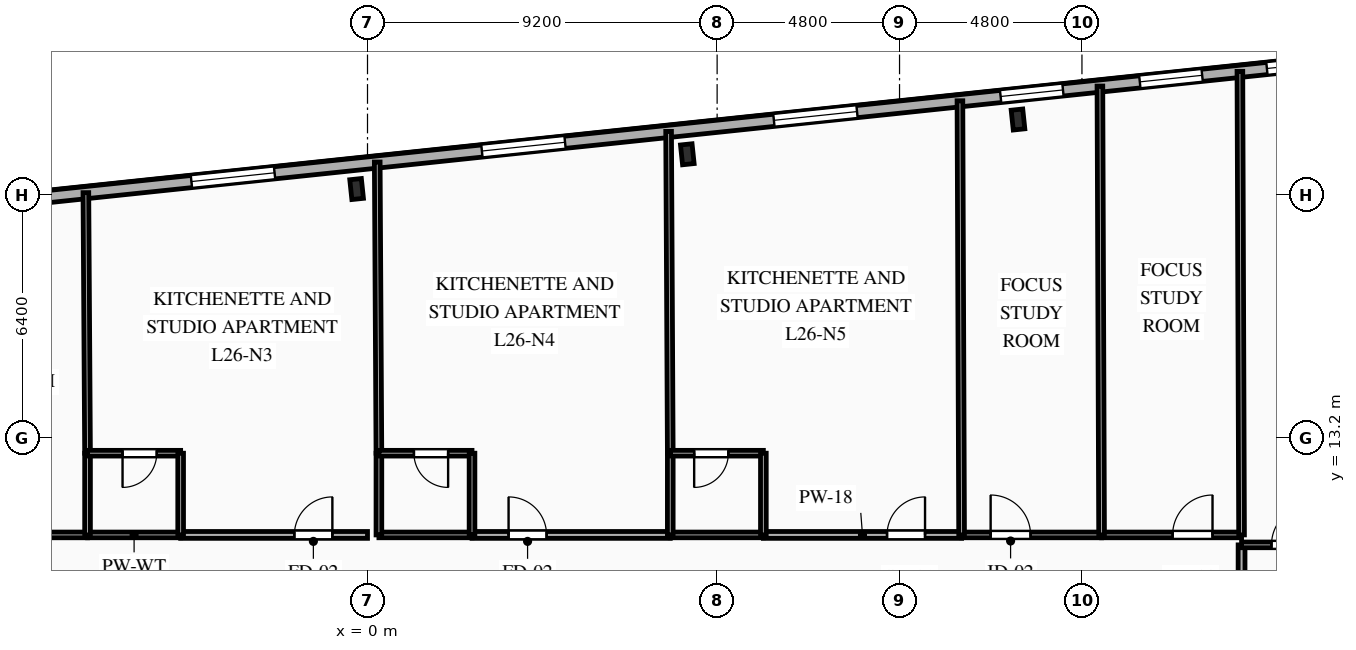
"""IFC4 building model, lengths in metres.
Left out: names, types, materials, properties, quantities, classifications, styles, units other than length and angle.
Written with IfcOpenShell. Run it as: python <this file> out.ifc"""

import sys

from ifc_helpers import new_model, si_unit, direction, frame, frame_2d, origin, origin_2d, place, context, subcontext, project, spatial, rectangle, i_section, extrude, element, fill, save


model = new_model("IFC4")
c1 = context("Model", 3, precision=1e-05, world=origin(), true_north=direction((0.0, 1.0)))
c2 = subcontext(c1, "Body", "Model", "MODEL_VIEW")
j1 = project(units=[si_unit("LENGTHUNIT", "METRE"), si_unit("PLANEANGLEUNIT", "RADIAN")], contexts=[c1])
p1 = place(None, origin())
s1 = spatial("IfcSite", under=j1, at=p1, CompositionType="ELEMENT")
p2 = place(p1, origin())
s2 = spatial("IfcBuilding", under=s1, at=p2, CompositionType="ELEMENT")
p3 = place(p2, frame((0.0, 0.0, 95.75)))
s3 = spatial("IfcBuildingStorey", under=s2, at=p3, CompositionType="ELEMENT", Elevation=95.75)
for number, where, z_axis, x_axis in (
    (1, (17.117, 21.58, 0.0), (0.0, 0.0, 1.0), (0.995, 0.105, 0.0)),
    (2, (8.415, 20.666, 0.0), (0.0, 0.0, 1.0), (0.995, 0.105, 0.0)),
    (3, (-0.287, 19.751, 0.0), (0.0, 0.0, 1.0), (0.995, 0.105, 0.0)),
):
    element("IfcColumn", number, at=place(p3, frame(where, z_axis=z_axis, x_axis=x_axis)), inside=s3, PredefinedType="COLUMN", context=c2, shape_type="SweptSolid", body=[
        extrude(i_section(OverallWidth=0.306, OverallDepth=0.524, WebThickness=0.021, FlangeThickness=0.04, FilletRadius=0.027, at=origin_2d()), origin(), (0.0, 0.0, 1.0), 3.35),
    ])
p4 = place(p3, frame((-27.107, 17.586, 0.0), z_axis=(0.0, 0.0, 1.0), x_axis=(0.994521628355, 0.104531003701, 0.0)))
e4 = element("IfcWall", 4, at=p4, inside=s3, PredefinedType="SOLIDWALL", context=c2, shape_type="SweptSolid", body=[
    extrude(rectangle(XDim=53.8, YDim=0.32, at=frame_2d((26.9, 0.0))), origin(), (0.0, 0.0, 1.0), 3.045),
])
p5 = place(p4, frame((7.261, 0.0, 0.85)))
e5 = element("IfcOpeningElement", 5, at=p5, cuts=e4, PredefinedType="OPENING", context=c2, shape_type="SweptSolid", body=[
    extrude(rectangle(XDim=1.65, YDim=1.85, at=frame_2d((0.825, 0.925))), frame((0.0, 0.17, 0.0), z_axis=(0.0, -1.0, 0.0), x_axis=(1.0, 0.0, 0.0)), (0.0, 0.0, 1.0), 0.34),
])
p6 = place(p4, frame((16.423, 0.0, 0.85)))
e6 = element("IfcOpeningElement", 6, at=p6, cuts=e4, PredefinedType="OPENING", context=c2, shape_type="SweptSolid", body=[
    extrude(rectangle(XDim=1.5, YDim=1.85, at=frame_2d((0.75, 0.925))), frame((0.0, 0.17, 0.0), z_axis=(0.0, -1.0, 0.0), x_axis=(1.0, 0.0, 0.0)), (0.0, 0.0, 1.0), 0.34),
])
p7 = place(p4, frame((22.598, 0.0, 0.85)))
e7 = element("IfcOpeningElement", 7, at=p7, cuts=e4, PredefinedType="OPENING", context=c2, shape_type="SweptSolid", body=[
    extrude(rectangle(XDim=2.2, YDim=1.85, at=frame_2d((1.1, 0.925))), frame((0.0, 0.17, 0.0), z_axis=(0.0, -1.0, 0.0), x_axis=(1.0, 0.0, 0.0)), (0.0, 0.0, 1.0), 0.34),
])
p8 = place(p4, frame((30.283, 0.0, 0.85)))
e8 = element("IfcOpeningElement", 8, at=p8, cuts=e4, PredefinedType="OPENING", context=c2, shape_type="SweptSolid", body=[
    extrude(rectangle(XDim=2.2, YDim=1.85, at=frame_2d((1.1, 0.925))), frame((0.0, 0.17, 0.0), z_axis=(0.0, -1.0, 0.0), x_axis=(1.0, 0.0, 0.0)), (0.0, 0.0, 1.0), 0.34),
])
p9 = place(p4, frame((38.009, 0.0, 0.85)))
e9 = element("IfcOpeningElement", 9, at=p9, cuts=e4, PredefinedType="OPENING", context=c2, shape_type="SweptSolid", body=[
    extrude(rectangle(XDim=2.2, YDim=1.85, at=frame_2d((1.1, 0.925))), frame((0.0, 0.17, 0.0), z_axis=(0.0, -1.0, 0.0), x_axis=(1.0, 0.0, 0.0)), (0.0, 0.0, 1.0), 0.34),
])
p10 = place(p4, frame((44.008, 0.0, 0.85)))
e10 = element("IfcOpeningElement", 10, at=p10, cuts=e4, PredefinedType="OPENING", context=c2, shape_type="SweptSolid", body=[
    extrude(rectangle(XDim=1.65, YDim=1.85, at=frame_2d((0.825, 0.925))), frame((0.0, 0.17, 0.0), z_axis=(0.0, -1.0, 0.0), x_axis=(1.0, 0.0, 0.0)), (0.0, 0.0, 1.0), 0.34),
])
p11 = place(p4, frame((47.691, 0.0, 0.85)))
e11 = element("IfcOpeningElement", 11, at=p11, cuts=e4, PredefinedType="OPENING", context=c2, shape_type="SweptSolid", body=[
    extrude(rectangle(XDim=1.65, YDim=1.85, at=frame_2d((0.825, 0.925))), frame((0.0, 0.17, 0.0), z_axis=(0.0, -1.0, 0.0), x_axis=(1.0, 0.0, 0.0)), (0.0, 0.0, 1.0), 0.34),
])
p12 = place(p4, frame((51.054, 0.0, 0.85)))
e12 = element("IfcOpeningElement", 12, at=p12, cuts=e4, PredefinedType="OPENING", context=c2, shape_type="SweptSolid", body=[
    extrude(rectangle(XDim=1.65, YDim=1.85, at=frame_2d((0.825, 0.925))), frame((0.0, 0.17, 0.0), z_axis=(0.0, -1.0, 0.0), x_axis=(1.0, 0.0, 0.0)), (0.0, 0.0, 1.0), 0.34),
])
p13 = place(p3, frame((-12.683, 10.65, 0.0), z_axis=(0.0, 0.0, 1.0), x_axis=(1.0, 0.0, 0.0)))
e13 = element("IfcWall", 13, at=p13, inside=s3, PredefinedType="PARTITIONING", context=c2, shape_type="SweptSolid", body=[
    extrude(rectangle(XDim=5.316, YDim=0.15, at=frame_2d((2.658, 0.0))), origin(), (0.0, 0.0, 1.0), 3.045),
])
p14 = place(p13, frame((0.981, 0.0, 0.0)))
e14 = element("IfcOpeningElement", 14, at=p14, cuts=e13, PredefinedType="OPENING", context=c2, shape_type="SweptSolid", body=[
    extrude(rectangle(XDim=0.95, YDim=2.1, at=frame_2d((0.475, 1.05))), frame((0.0, 0.085, 0.0), z_axis=(0.0, -1.0, 0.0), x_axis=(1.0, 0.0, 0.0)), (0.0, 0.0, 1.0), 0.17),
])
p15 = place(p3, frame((-4.917, 10.65, 0.0), z_axis=(0.0, 0.0, 1.0), x_axis=(1.0, 0.0, 0.0)))
e15 = element("IfcWall", 15, at=p15, inside=s3, PredefinedType="PARTITIONING", context=c2, shape_type="SweptSolid", body=[
    extrude(rectangle(XDim=4.917, YDim=0.18, at=frame_2d((2.458, 0.0))), origin(), (0.0, 0.0, 1.0), 3.045),
])
p16 = place(p15, frame((2.992, 0.0, 0.0)))
e16 = element("IfcOpeningElement", 16, at=p16, cuts=e15, PredefinedType="OPENING", context=c2, shape_type="SweptSolid", body=[
    extrude(rectangle(XDim=1.0, YDim=2.15, at=frame_2d((0.5, 1.075))), frame((0.0, 0.1, 0.0), z_axis=(0.0, -1.0, 0.0), x_axis=(1.0, 0.0, 0.0)), (0.0, 0.0, 1.0), 0.2),
])
p17 = place(p3, frame((-7.367, 10.65, 0.0), z_axis=(0.0, 0.0, 1.0), x_axis=(1.0, 0.0, 0.0)))
e17 = element("IfcWall", 17, at=p17, inside=s3, PredefinedType="PLUMBINGWALL", context=c2, shape_type="SweptSolid", body=[
    extrude(rectangle(XDim=2.45, YDim=0.15, at=frame_2d((1.225, 0.0))), origin(), (0.0, 0.0, 1.0), 3.045),
])
p18 = place(p3, frame((23.0, 10.388, 0.0), z_axis=(0.0, 0.0, 1.0), x_axis=(0.0, -1.0, 0.0)))
e18 = element("IfcWall", 18, at=p18, inside=s3, PredefinedType="PARTITIONING", context=c2, shape_type="SweptSolid", body=[
    extrude(rectangle(XDim=1.888, YDim=0.18, at=frame_2d((0.944, 0.0))), origin(), (0.0, 0.0, 1.0), 3.045),
])
p19 = place(p3, frame((2.75, 10.65, 0.0), z_axis=(0.0, 0.0, 1.0), x_axis=(1.0, 0.0, 0.0)))
e19 = element("IfcWall", 19, at=p19, inside=s3, PredefinedType="PARTITIONING", context=c2, shape_type="SweptSolid", body=[
    extrude(rectangle(XDim=5.217, YDim=0.18, at=frame_2d((2.608, 0.0))), origin(), (0.0, 0.0, 1.0), 3.045),
])
p20 = place(p19, frame((0.962, 0.0, 0.0)))
e20 = element("IfcOpeningElement", 20, at=p20, cuts=e19, PredefinedType="OPENING", context=c2, shape_type="SweptSolid", body=[
    extrude(rectangle(XDim=1.0, YDim=2.15, at=frame_2d((0.5, 1.075))), frame((0.0, 0.1, 0.0), z_axis=(0.0, -1.0, 0.0), x_axis=(1.0, 0.0, 0.0)), (0.0, 0.0, 1.0), 0.2),
])
p21 = place(p3, frame((0.3, 10.65, 0.0), z_axis=(0.0, 0.0, 1.0), x_axis=(1.0, 0.0, 0.0)))
e21 = element("IfcWall", 21, at=p21, inside=s3, PredefinedType="PLUMBINGWALL", context=c2, shape_type="SweptSolid", body=[
    extrude(rectangle(XDim=2.45, YDim=0.15, at=frame_2d((1.225, 0.0))), origin(), (0.0, 0.0, 1.0), 3.045),
])
p22 = place(p3, frame((10.417, 10.65, 0.0), z_axis=(0.0, 0.0, 1.0), x_axis=(1.0, 0.0, 0.0)))
e22 = element("IfcWall", 22, at=p22, inside=s3, PredefinedType="PARTITIONING", context=c2, shape_type="SweptSolid", body=[
    extrude(rectangle(XDim=5.216, YDim=0.18, at=frame_2d((2.608, 0.0))), origin(), (0.0, 0.0, 1.0), 3.045),
])
p23 = place(p22, frame((3.254, 0.0, 0.0)))
e23 = element("IfcOpeningElement", 23, at=p23, cuts=e22, PredefinedType="OPENING", context=c2, shape_type="SweptSolid", body=[
    extrude(rectangle(XDim=1.0, YDim=2.15, at=frame_2d((0.5, 1.075))), frame((0.0, 0.1, 0.0), z_axis=(0.0, -1.0, 0.0), x_axis=(1.0, 0.0, 0.0)), (0.0, 0.0, 1.0), 0.2),
])
p24 = place(p3, frame((7.967, 10.65, 0.0), z_axis=(0.0, 0.0, 1.0), x_axis=(1.0, 0.0, 0.0)))
e24 = element("IfcWall", 24, at=p24, inside=s3, PredefinedType="PLUMBINGWALL", context=c2, shape_type="SweptSolid", body=[
    extrude(rectangle(XDim=2.45, YDim=0.15, at=frame_2d((1.225, 0.0))), origin(), (0.0, 0.0, 1.0), 3.045),
])
p25 = place(p3, frame((15.633, 10.65, 0.0), z_axis=(0.0, 0.0, 1.0), x_axis=(1.0, 0.0, 0.0)))
e25 = element("IfcWall", 25, at=p25, inside=s3, PredefinedType="PARTITIONING", context=c2, shape_type="SweptSolid", body=[
    extrude(rectangle(XDim=3.683, YDim=0.15, at=frame_2d((1.842, 0.0))), origin(), (0.0, 0.0, 1.0), 3.045),
])
p26 = place(p25, frame((0.764, 0.0, 0.0)))
e26 = element("IfcOpeningElement", 26, at=p26, cuts=e25, PredefinedType="OPENING", context=c2, shape_type="SweptSolid", body=[
    extrude(rectangle(XDim=1.05, YDim=2.15, at=frame_2d((0.525, 1.075))), frame((0.0, 0.085, 0.0), z_axis=(0.0, -1.0, 0.0), x_axis=(1.0, 0.0, 0.0)), (0.0, 0.0, 1.0), 0.17),
])
p27 = place(p3, frame((19.316, 10.65, 0.0), z_axis=(0.0, 0.0, 1.0), x_axis=(1.0, 0.0, 0.0)))
e27 = element("IfcWall", 27, at=p27, inside=s3, PredefinedType="PARTITIONING", context=c2, shape_type="SweptSolid", body=[
    extrude(rectangle(XDim=3.684, YDim=0.15, at=frame_2d((1.842, 0.0))), origin(), (0.0, 0.0, 1.0), 3.045),
])
p28 = place(p27, frame((1.869, 0.0, 0.0)))
e28 = element("IfcOpeningElement", 28, at=p28, cuts=e27, PredefinedType="OPENING", context=c2, shape_type="SweptSolid", body=[
    extrude(rectangle(XDim=1.05, YDim=2.15, at=frame_2d((0.525, 1.075))), frame((0.0, 0.085, 0.0), z_axis=(0.0, -1.0, 0.0), x_axis=(1.0, 0.0, 0.0)), (0.0, 0.0, 1.0), 0.17),
])
p29 = place(p3, frame((23.0, 10.388, 0.0), z_axis=(0.0, 0.0, 1.0), x_axis=(1.0, 0.0, 0.0)))
e29 = element("IfcWall", 29, at=p29, inside=s3, PredefinedType="PARTITIONING", context=c2, shape_type="SweptSolid", body=[
    extrude(rectangle(XDim=3.871, YDim=0.15, at=frame_2d((1.936, 0.0))), origin(), (0.0, 0.0, 1.0), 3.045),
])
p30 = place(p29, frame((0.788, 0.0, 0.0)))
e30 = element("IfcOpeningElement", 30, at=p30, cuts=e29, PredefinedType="OPENING", context=c2, shape_type="SweptSolid", body=[
    extrude(rectangle(XDim=1.05, YDim=2.15, at=frame_2d((0.525, 1.075))), frame((0.0, 0.085, 0.0), z_axis=(0.0, -1.0, 0.0), x_axis=(1.0, 0.0, 0.0)), (0.0, 0.0, 1.0), 0.17),
])
p31 = place(p3, frame((23.0, 10.65, 0.0), z_axis=(0.0, 0.0, 1.0), x_axis=(-0.0036027147, 0.999993510202, 0.0)))
e31 = element("IfcWall", 31, at=p31, inside=s3, PredefinedType="PARTITIONING", context=c2, shape_type="SweptSolid", body=[
    extrude(rectangle(XDim=12.198, YDim=0.15, at=frame_2d((6.099, 0.0))), origin(), (0.0, 0.0, 1.0), 3.045),
])
p32 = place(p3, frame((-7.411, 19.656, 0.0), z_axis=(0.0, 0.0, 1.0), x_axis=(0.006409668201, -0.999979457866, 0.0)))
e32 = element("IfcWall", 32, at=p32, inside=s3, PredefinedType="PARTITIONING", context=c2, shape_type="SweptSolid", body=[
    extrude(rectangle(XDim=6.856, YDim=0.15, at=frame_2d((3.428, 0.0))), origin(), (0.0, 0.0, 1.0), 3.045),
])
p33 = place(p3, frame((-7.367, 12.8, 0.0), z_axis=(0.0, 0.0, 1.0), x_axis=(0.0, -1.0, 0.0)))
e33 = element("IfcWall", 33, at=p33, inside=s3, PredefinedType="PLUMBINGWALL", context=c2, shape_type="SweptSolid", body=[
    extrude(rectangle(XDim=2.15, YDim=0.15, at=frame_2d((1.075, 0.0))), origin(), (0.0, 0.0, 1.0), 3.045),
])
p34 = place(p3, frame((-4.917, 12.8, 0.0), z_axis=(0.0, 0.0, 1.0), x_axis=(-1.0, 0.0, 0.0)))
e34 = element("IfcWall", 34, at=p34, inside=s3, PredefinedType="PLUMBINGWALL", context=c2, shape_type="SweptSolid", body=[
    extrude(rectangle(XDim=2.45, YDim=0.15, at=frame_2d((1.225, 0.0))), origin(), (0.0, 0.0, 1.0), 3.045),
])
p35 = place(p34, frame((0.629, 0.0, 0.0)))
e35 = element("IfcOpeningElement", 35, at=p35, cuts=e34, PredefinedType="OPENING", context=c2, shape_type="SweptSolid", body=[
    extrude(rectangle(XDim=0.9, YDim=2.1, at=frame_2d((0.45, 1.05))), frame((0.0, 0.085, 0.0), z_axis=(0.0, -1.0, 0.0), x_axis=(1.0, 0.0, 0.0)), (0.0, 0.0, 1.0), 0.17),
])
p36 = place(p3, frame((-4.917, 10.65, 0.0), z_axis=(0.0, 0.0, 1.0), x_axis=(0.0, 1.0, 0.0)))
e36 = element("IfcWall", 36, at=p36, inside=s3, PredefinedType="PLUMBINGWALL", context=c2, shape_type="SweptSolid", body=[
    extrude(rectangle(XDim=2.15, YDim=0.15, at=frame_2d((1.075, 0.0))), origin(), (0.0, 0.0, 1.0), 3.045),
])
p37 = place(p3, frame((0.256, 20.462, 0.0), z_axis=(0.0, 0.0, 1.0), x_axis=(0.00573567775, -0.999983550865, 0.0)))
e37 = element("IfcWall", 37, at=p37, inside=s3, PredefinedType="PARTITIONING", context=c2, shape_type="SweptSolid", body=[
    extrude(rectangle(XDim=7.662, YDim=0.15, at=frame_2d((3.831, 0.0))), origin(), (0.0, 0.0, 1.0), 3.045),
])
p38 = place(p3, frame((0.3, 12.8, 0.0), z_axis=(0.0, 0.0, 1.0), x_axis=(0.0, -1.0, 0.0)))
e38 = element("IfcWall", 38, at=p38, inside=s3, PredefinedType="PLUMBINGWALL", context=c2, shape_type="SweptSolid", body=[
    extrude(rectangle(XDim=2.15, YDim=0.15, at=frame_2d((1.075, 0.0))), origin(), (0.0, 0.0, 1.0), 3.045),
])
p39 = place(p3, frame((2.75, 12.8, 0.0), z_axis=(0.0, 0.0, 1.0), x_axis=(-1.0, 0.0, 0.0)))
e39 = element("IfcWall", 39, at=p39, inside=s3, PredefinedType="PLUMBINGWALL", context=c2, shape_type="SweptSolid", body=[
    extrude(rectangle(XDim=2.45, YDim=0.15, at=frame_2d((1.225, 0.0))), origin(), (0.0, 0.0, 1.0), 3.045),
])
p40 = place(p39, frame((0.629, 0.0, 0.0)))
e40 = element("IfcOpeningElement", 40, at=p40, cuts=e39, PredefinedType="OPENING", context=c2, shape_type="SweptSolid", body=[
    extrude(rectangle(XDim=0.9, YDim=2.1, at=frame_2d((0.45, 1.05))), frame((0.0, 0.085, 0.0), z_axis=(0.0, -1.0, 0.0), x_axis=(1.0, 0.0, 0.0)), (0.0, 0.0, 1.0), 0.17),
])
p41 = place(p3, frame((2.75, 10.65, 0.0), z_axis=(0.0, 0.0, 1.0), x_axis=(0.0, 1.0, 0.0)))
e41 = element("IfcWall", 41, at=p41, inside=s3, PredefinedType="PLUMBINGWALL", context=c2, shape_type="SweptSolid", body=[
    extrude(rectangle(XDim=2.15, YDim=0.15, at=frame_2d((1.075, 0.0))), origin(), (0.0, 0.0, 1.0), 3.045),
])
p42 = place(p3, frame((7.923, 21.268, 0.0), z_axis=(0.0, 0.0, 1.0), x_axis=(0.005189792576, -0.999986532936, 0.0)))
e42 = element("IfcWall", 42, at=p42, inside=s3, PredefinedType="PARTITIONING", context=c2, shape_type="SweptSolid", body=[
    extrude(rectangle(XDim=8.468, YDim=0.15, at=frame_2d((4.234, 0.0))), origin(), (0.0, 0.0, 1.0), 3.045),
])
p43 = place(p3, frame((7.967, 12.8, 0.0), z_axis=(0.0, 0.0, 1.0), x_axis=(0.0, -1.0, 0.0)))
e43 = element("IfcWall", 43, at=p43, inside=s3, PredefinedType="PLUMBINGWALL", context=c2, shape_type="SweptSolid", body=[
    extrude(rectangle(XDim=2.15, YDim=0.15, at=frame_2d((1.075, 0.0))), origin(), (0.0, 0.0, 1.0), 3.045),
])
p44 = place(p3, frame((10.417, 12.8, 0.0), z_axis=(0.0, 0.0, 1.0), x_axis=(-1.0, 0.0, 0.0)))
e44 = element("IfcWall", 44, at=p44, inside=s3, PredefinedType="PLUMBINGWALL", context=c2, shape_type="SweptSolid", body=[
    extrude(rectangle(XDim=2.45, YDim=0.15, at=frame_2d((1.225, 0.0))), origin(), (0.0, 0.0, 1.0), 3.045),
])
p45 = place(p44, frame((0.921, 0.0, 0.0)))
e45 = element("IfcOpeningElement", 45, at=p45, cuts=e44, PredefinedType="OPENING", context=c2, shape_type="SweptSolid", body=[
    extrude(rectangle(XDim=0.9, YDim=2.1, at=frame_2d((0.45, 1.05))), frame((0.0, 0.085, 0.0), z_axis=(0.0, -1.0, 0.0), x_axis=(1.0, 0.0, 0.0)), (0.0, 0.0, 1.0), 0.17),
])
p46 = place(p3, frame((10.417, 10.65, 0.0), z_axis=(0.0, 0.0, 1.0), x_axis=(0.0, 1.0, 0.0)))
e46 = element("IfcWall", 46, at=p46, inside=s3, PredefinedType="PLUMBINGWALL", context=c2, shape_type="SweptSolid", body=[
    extrude(rectangle(XDim=2.15, YDim=0.15, at=frame_2d((1.075, 0.0))), origin(), (0.0, 0.0, 1.0), 3.045),
])
p47 = place(p3, frame((15.589, 22.073, 0.0), z_axis=(0.0, 0.0, 1.0), x_axis=(0.003846947384, -0.999992600471, 0.0)))
e47 = element("IfcWall", 47, at=p47, inside=s3, PredefinedType="PARTITIONING", context=c2, shape_type="SweptSolid", body=[
    extrude(rectangle(XDim=11.423, YDim=0.15, at=frame_2d((5.712, 0.0))), origin(), (0.0, 0.0, 1.0), 3.045),
])
p48 = place(p3, frame((19.273, 22.46, 0.0), z_axis=(0.0, 0.0, 1.0), x_axis=(0.003700156578, -0.999993154397, 0.0)))
e48 = element("IfcWall", 48, at=p48, inside=s3, PredefinedType="PARTITIONING", context=c2, shape_type="SweptSolid", body=[
    extrude(rectangle(XDim=11.811, YDim=0.15, at=frame_2d((5.905, 0.0))), origin(), (0.0, 0.0, 1.0), 3.045),
])
p49 = place(p7, origin())
e49 = element("IfcWindow", 49, at=p49, inside=s3, PartitioningType="SINGLE_PANEL", PredefinedType="WINDOW", context=c2, shape_type="SweptSolid", body=[
    extrude(rectangle(XDim=2.2, YDim=1.85, at=frame_2d((1.1, 0.925))), frame((0.0, 0.03, 0.0), z_axis=(0.0, -1.0, 0.0), x_axis=(1.0, 0.0, 0.0)), (0.0, 0.0, 1.0), 0.06),
])
fill(e7, e49)
p50 = place(p8, origin())
e50 = element("IfcWindow", 50, at=p50, inside=s3, PartitioningType="SINGLE_PANEL", PredefinedType="WINDOW", context=c2, shape_type="SweptSolid", body=[
    extrude(rectangle(XDim=2.2, YDim=1.85, at=frame_2d((1.1, 0.925))), frame((0.0, 0.03, 0.0), z_axis=(0.0, -1.0, 0.0), x_axis=(1.0, 0.0, 0.0)), (0.0, 0.0, 1.0), 0.06),
])
fill(e8, e50)
p51 = place(p9, origin())
e51 = element("IfcWindow", 51, at=p51, inside=s3, PartitioningType="SINGLE_PANEL", PredefinedType="WINDOW", context=c2, shape_type="SweptSolid", body=[
    extrude(rectangle(XDim=2.2, YDim=1.85, at=frame_2d((1.1, 0.925))), frame((0.0, 0.03, 0.0), z_axis=(0.0, -1.0, 0.0), x_axis=(1.0, 0.0, 0.0)), (0.0, 0.0, 1.0), 0.06),
])
fill(e9, e51)
p52 = place(p10, origin())
e52 = element("IfcWindow", 52, at=p52, inside=s3, PartitioningType="SINGLE_PANEL", PredefinedType="WINDOW", context=c2, shape_type="SweptSolid", body=[
    extrude(rectangle(XDim=1.65, YDim=1.85, at=frame_2d((0.825, 0.925))), frame((0.0, 0.03, 0.0), z_axis=(0.0, -1.0, 0.0), x_axis=(1.0, 0.0, 0.0)), (0.0, 0.0, 1.0), 0.06),
])
fill(e10, e52)
p53 = place(p11, origin())
e53 = element("IfcWindow", 53, at=p53, inside=s3, PartitioningType="SINGLE_PANEL", PredefinedType="WINDOW", context=c2, shape_type="SweptSolid", body=[
    extrude(rectangle(XDim=1.65, YDim=1.85, at=frame_2d((0.825, 0.925))), frame((0.0, 0.03, 0.0), z_axis=(0.0, -1.0, 0.0), x_axis=(1.0, 0.0, 0.0)), (0.0, 0.0, 1.0), 0.06),
])
fill(e11, e53)
p54 = place(p12, origin())
e54 = element("IfcWindow", 54, at=p54, inside=s3, PartitioningType="SINGLE_PANEL", PredefinedType="WINDOW", context=c2, shape_type="SweptSolid", body=[
    extrude(rectangle(XDim=1.65, YDim=1.85, at=frame_2d((0.825, 0.925))), frame((0.0, 0.03, 0.0), z_axis=(0.0, -1.0, 0.0), x_axis=(1.0, 0.0, 0.0)), (0.0, 0.0, 1.0), 0.06),
])
fill(e12, e54)
p55 = place(p16, origin())
e55 = element("IfcDoor", 55, at=p55, inside=s3, OperationType="SINGLE_SWING_RIGHT", PredefinedType="DOOR", context=c2, shape_type="SweptSolid", body=[
    extrude(rectangle(XDim=1.0, YDim=2.15, at=frame_2d((0.5, 1.075))), frame((0.0, 0.025, 0.0), z_axis=(0.0, -1.0, 0.0), x_axis=(1.0, 0.0, 0.0)), (0.0, 0.0, 1.0), 0.05),
])
fill(e16, e55)
p56 = place(p20, origin())
e56 = element("IfcDoor", 56, at=p56, inside=s3, OperationType="SINGLE_SWING_LEFT", PredefinedType="DOOR", context=c2, shape_type="SweptSolid", body=[
    extrude(rectangle(XDim=1.0, YDim=2.15, at=frame_2d((0.5, 1.075))), frame((0.0, 0.025, 0.0), z_axis=(0.0, -1.0, 0.0), x_axis=(1.0, 0.0, 0.0)), (0.0, 0.0, 1.0), 0.05),
])
fill(e20, e56)
p57 = place(p23, origin())
e57 = element("IfcDoor", 57, at=p57, inside=s3, OperationType="SINGLE_SWING_RIGHT", PredefinedType="DOOR", context=c2, shape_type="SweptSolid", body=[
    extrude(rectangle(XDim=1.0, YDim=2.15, at=frame_2d((0.5, 1.075))), frame((0.0, 0.025, 0.0), z_axis=(0.0, -1.0, 0.0), x_axis=(1.0, 0.0, 0.0)), (0.0, 0.0, 1.0), 0.05),
])
fill(e23, e57)
p58 = place(p26, origin())
e58 = element("IfcDoor", 58, at=p58, inside=s3, OperationType="SINGLE_SWING_LEFT", PredefinedType="DOOR", context=c2, shape_type="SweptSolid", body=[
    extrude(rectangle(XDim=1.05, YDim=2.15, at=frame_2d((0.525, 1.075))), frame((0.0, 0.025, 0.0), z_axis=(0.0, -1.0, 0.0), x_axis=(1.0, 0.0, 0.0)), (0.0, 0.0, 1.0), 0.05),
])
fill(e26, e58)
p59 = place(p28, origin())
e59 = element("IfcDoor", 59, at=p59, inside=s3, OperationType="SINGLE_SWING_RIGHT", PredefinedType="DOOR", context=c2, shape_type="SweptSolid", body=[
    extrude(rectangle(XDim=1.05, YDim=2.15, at=frame_2d((0.525, 1.075))), frame((0.0, 0.025, 0.0), z_axis=(0.0, -1.0, 0.0), x_axis=(1.0, 0.0, 0.0)), (0.0, 0.0, 1.0), 0.05),
])
fill(e28, e59)
p60 = place(p30, origin())
e60 = element("IfcDoor", 60, at=p60, inside=s3, OperationType="SINGLE_SWING_RIGHT", PredefinedType="DOOR", context=c2, shape_type="SweptSolid", body=[
    extrude(rectangle(XDim=1.05, YDim=2.15, at=frame_2d((0.525, 1.075))), frame((0.0, 0.025, 0.0), z_axis=(0.0, -1.0, 0.0), x_axis=(1.0, 0.0, 0.0)), (0.0, 0.0, 1.0), 0.05),
])
fill(e30, e60)
p61 = place(p35, origin())
e61 = element("IfcDoor", 61, at=p61, inside=s3, OperationType="SINGLE_SWING_RIGHT", PredefinedType="DOOR", context=c2, shape_type="SweptSolid", body=[
    extrude(rectangle(XDim=0.9, YDim=2.1, at=frame_2d((0.45, 1.05))), frame((0.0, 0.025, 0.0), z_axis=(0.0, -1.0, 0.0), x_axis=(1.0, 0.0, 0.0)), (0.0, 0.0, 1.0), 0.05),
])
fill(e35, e61)
p62 = place(p40, origin())
e62 = element("IfcDoor", 62, at=p62, inside=s3, OperationType="SINGLE_SWING_LEFT", PredefinedType="DOOR", context=c2, shape_type="SweptSolid", body=[
    extrude(rectangle(XDim=0.9, YDim=2.1, at=frame_2d((0.45, 1.05))), frame((0.0, 0.025, 0.0), z_axis=(0.0, -1.0, 0.0), x_axis=(1.0, 0.0, 0.0)), (0.0, 0.0, 1.0), 0.05),
])
fill(e40, e62)
p63 = place(p45, origin())
e63 = element("IfcDoor", 63, at=p63, inside=s3, OperationType="SINGLE_SWING_RIGHT", PredefinedType="DOOR", context=c2, shape_type="SweptSolid", body=[
    extrude(rectangle(XDim=0.9, YDim=2.1, at=frame_2d((0.45, 1.05))), frame((0.0, 0.025, 0.0), z_axis=(0.0, -1.0, 0.0), x_axis=(1.0, 0.0, 0.0)), (0.0, 0.0, 1.0), 0.05),
])
fill(e45, e63)
save(model, sys.argv[1])
